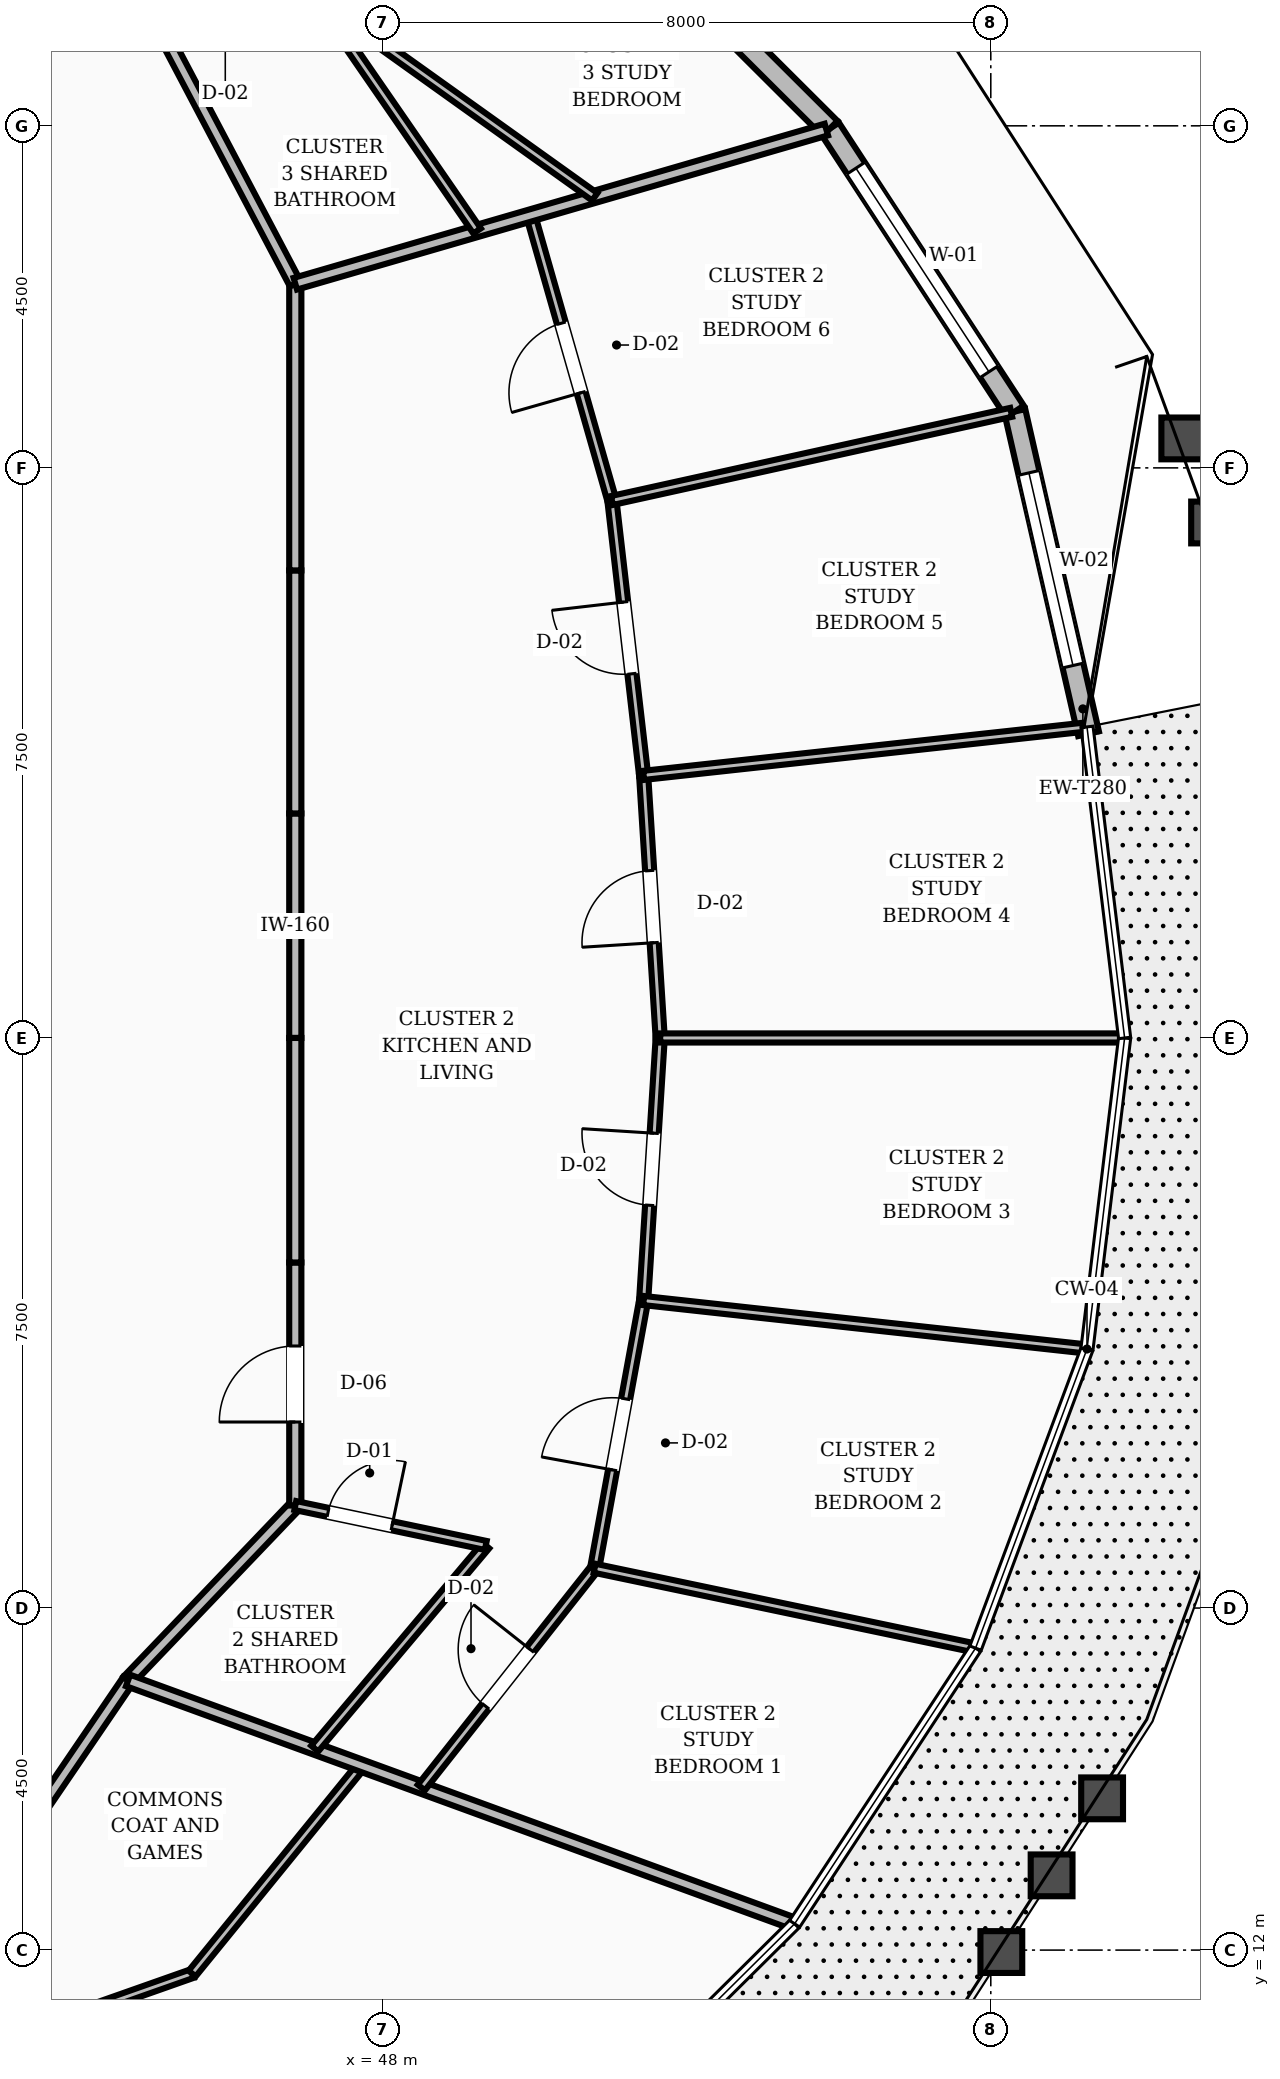
"""IFC4 building model, lengths in metres.
Left out: names, types, materials, properties, quantities, classifications, styles, units other than length and angle.
Written with IfcOpenShell. Run it as: python <this file> out.ifc"""

import sys

from ifc_helpers import new_model, si_unit, direction, frame, frame_2d, origin, place, context, subcontext, project, spatial, rectangle, extrude, element, fill, save


model = new_model("IFC4")
c1 = context("Model", 3, precision=1e-05, world=origin(), true_north=direction((0.0, 1.0)))
c2 = subcontext(c1, "Body", "Model", "MODEL_VIEW")
j1 = project(units=[si_unit("LENGTHUNIT", "METRE"), si_unit("PLANEANGLEUNIT", "RADIAN")], contexts=[c1])
p1 = place(None, origin())
s1 = spatial("IfcSite", under=j1, at=p1, CompositionType="ELEMENT")
p2 = place(p1, origin())
s2 = spatial("IfcBuilding", under=s1, at=p2, CompositionType="ELEMENT")
p3 = place(p2, frame((0.0, 0.0, 153.2)))
s3 = spatial("IfcBuildingStorey", under=s2, at=p3, CompositionType="ELEMENT", Elevation=153.2)
p4 = place(p3, frame((57.286, 28.003, 0.0), z_axis=(0.0, 0.0, 1.0), x_axis=(-0.222841571078, 0.974854673374, 0.0)))
e1 = element("IfcWall", 1, at=p4, inside=s3, PredefinedType="STANDARD", context=c2, shape_type="SweptSolid", body=[
    extrude(rectangle(XDim=4.348, YDim=0.28, at=frame_2d((2.174, 0.0))), origin(), (0.0, 0.0, 1.0), 2.82),
])
p5 = place(p4, frame((0.92, 0.0, 0.8)))
e2 = element("IfcOpeningElement", 2, at=p5, cuts=e1, PredefinedType="OPENING", context=c2, shape_type="SweptSolid", body=[
    extrude(rectangle(XDim=2.6, YDim=1.65, at=frame_2d((1.3, 0.825))), frame((0.0, 0.15, 0.0), z_axis=(0.0, -1.0, 0.0), x_axis=(1.0, 0.0, 0.0)), (0.0, 0.0, 1.0), 0.3),
])
p6 = place(p3, frame((56.317, 32.242, 0.0), z_axis=(0.0, 0.0, 1.0), x_axis=(-0.546910623985, 0.837190999338, 0.0)))
e3 = element("IfcWall", 3, at=p6, inside=s3, PredefinedType="STANDARD", context=c2, shape_type="SweptSolid", body=[
    extrude(rectangle(XDim=4.448, YDim=0.28, at=frame_2d((2.224, 0.0))), origin(), (0.0, 0.0, 1.0), 2.82),
])
p7 = place(p6, frame((0.624, 0.0, 0.8)))
e4 = element("IfcOpeningElement", 4, at=p7, cuts=e3, PredefinedType="OPENING", context=c2, shape_type="SweptSolid", body=[
    extrude(rectangle(XDim=3.2, YDim=1.65, at=frame_2d((1.6, 0.825))), frame((0.0, 0.15, 0.0), z_axis=(0.0, -1.0, 0.0), x_axis=(1.0, 0.0, 0.0)), (0.0, 0.0, 1.0), 0.3),
])
p8 = place(p3, frame((53.885, 35.965, 0.0), z_axis=(0.0, 0.0, 1.0), x_axis=(-0.708162399008, 0.706049585108, 0.0)))
e5 = element("IfcWall", 5, at=p8, inside=s3, PredefinedType="STANDARD", context=c2, shape_type="SweptSolid", body=[
    extrude(rectangle(XDim=4.622, YDim=0.28, at=frame_2d((2.311, 0.0))), origin(), (0.0, 0.0, 1.0), 2.82),
])
p9 = place(p3, frame((46.85, 24.0, 0.0), z_axis=(0.0, 0.0, 1.0), x_axis=(0.0, 1.0, 0.0)))
e6 = element("IfcWall", 6, at=p9, inside=s3, PredefinedType="SOLIDWALL", context=c2, shape_type="SweptSolid", body=[
    extrude(rectangle(XDim=2.954, YDim=0.16, at=frame_2d((1.477, 0.0))), origin(), (0.0, 0.0, 1.0), 2.8),
])
p10 = place(p3, frame((46.85, 26.954, 0.0), z_axis=(0.0, 0.0, 1.0), x_axis=(0.0, 1.0, 0.0)))
e7 = element("IfcWall", 7, at=p10, inside=s3, PredefinedType="SOLIDWALL", context=c2, shape_type="SweptSolid", body=[
    extrude(rectangle(XDim=3.197, YDim=0.16, at=frame_2d((1.599, 0.0))), origin(), (0.0, 0.0, 1.0), 2.8),
])
p11 = place(p3, frame((46.85, 30.151, 0.0), z_axis=(0.0, 0.0, 1.0), x_axis=(0.0, 1.0, 0.0)))
e8 = element("IfcWall", 8, at=p11, inside=s3, PredefinedType="SOLIDWALL", context=c2, shape_type="SweptSolid", body=[
    extrude(rectangle(XDim=3.771, YDim=0.16, at=frame_2d((1.886, 0.0))), origin(), (0.0, 0.0, 1.0), 2.8),
])
p12 = place(p3, frame((46.85, 33.923, 0.0), z_axis=(0.0, 0.0, 1.0), x_axis=(-0.466093963429, 0.884735224378, 0.0)))
e9 = element("IfcWall", 9, at=p12, inside=s3, PredefinedType="SOLIDWALL", context=c2, shape_type="SweptSolid", body=[
    extrude(rectangle(XDim=3.648, YDim=0.16, at=frame_2d((1.824, 0.0))), origin(), (0.0, 0.0, 1.0), 2.8),
])
p13 = place(p3, frame((42.95, 13.05, 0.0), z_axis=(0.0, 0.0, 1.0), x_axis=(0.562674669208, 0.826678423955, 0.0)))
e10 = element("IfcWall", 10, at=p13, inside=s3, PredefinedType="SOLIDWALL", context=c2, shape_type="SweptSolid", body=[
    extrude(rectangle(XDim=3.021, YDim=0.16, at=frame_2d((1.511, 0.0))), origin(), (0.0, 0.0, 1.0), 2.8),
])
p14 = place(p3, frame((44.65, 15.548, 0.0), z_axis=(0.0, 0.0, 1.0), x_axis=(0.691055487108, 0.722801711216, 0.0)))
e11 = element("IfcWall", 11, at=p14, inside=s3, PredefinedType="SOLIDWALL", context=c2, shape_type="SweptSolid", body=[
    extrude(rectangle(XDim=3.184, YDim=0.16, at=frame_2d((1.592, 0.0))), origin(), (0.0, 0.0, 1.0), 2.8),
])
p15 = place(p3, frame((46.85, 17.849, 0.0), z_axis=(0.0, 0.0, 1.0), x_axis=(0.0, 1.0, 0.0)))
e12 = element("IfcWall", 12, at=p15, inside=s3, PredefinedType="SOLIDWALL", context=c2, shape_type="SweptSolid", body=[
    extrude(rectangle(XDim=3.197, YDim=0.16, at=frame_2d((1.599, 0.0))), origin(), (0.0, 0.0, 1.0), 2.8),
])
p16 = place(p15, frame((1.099, 0.0, 0.0)))
e13 = element("IfcOpeningElement", 13, at=p16, cuts=e12, PredefinedType="OPENING", context=c2, shape_type="SweptSolid", body=[
    extrude(rectangle(XDim=1.0, YDim=2.1, at=frame_2d((0.5, 1.05))), frame((0.0, 0.09, 0.0), z_axis=(0.0, -1.0, 0.0), x_axis=(1.0, 0.0, 0.0)), (0.0, 0.0, 1.0), 0.18),
])
p17 = place(p3, frame((46.85, 21.046, 0.0), z_axis=(0.0, 0.0, 1.0), x_axis=(0.0, 1.0, 0.0)))
e14 = element("IfcWall", 14, at=p17, inside=s3, PredefinedType="SOLIDWALL", context=c2, shape_type="SweptSolid", body=[
    extrude(rectangle(XDim=2.954, YDim=0.16, at=frame_2d((1.477, 0.0))), origin(), (0.0, 0.0, 1.0), 2.8),
])
p18 = place(p3, frame((41.982, 10.453, 0.0), z_axis=(0.0, 0.0, 1.0), x_axis=(0.94308593852, 0.332549113013, 0.0)))
e15 = element("IfcWall", 15, at=p18, inside=s3, PredefinedType="PARTITIONING", context=c2, shape_type="SweptSolid", body=[
    extrude(rectangle(XDim=3.723, YDim=0.12, at=frame_2d((1.861, 0.0))), origin(), (0.0, 0.0, 1.0), 2.8),
])
p19 = place(p3, frame((45.493, 11.691, 0.0), z_axis=(0.0, 0.0, 1.0), x_axis=(0.631181350176, 0.775635290062, 0.0)))
e16 = element("IfcWall", 16, at=p19, inside=s3, PredefinedType="PARTITIONING", context=c2, shape_type="SweptSolid", body=[
    extrude(rectangle(XDim=3.527, YDim=0.12, at=frame_2d((1.764, 0.0))), origin(), (0.0, 0.0, 1.0), 2.8),
])
p20 = place(p3, frame((44.65, 15.548, 0.0), z_axis=(0.0, 0.0, 1.0), x_axis=(0.939358933145, -0.342935554763, 0.0)))
e17 = element("IfcWall", 17, at=p20, inside=s3, PredefinedType="SOLIDWALL", context=c2, shape_type="SweptSolid", body=[
    extrude(rectangle(XDim=9.285, YDim=0.16, at=frame_2d((4.643, 0.0))), origin(), (0.0, 0.0, 1.0), 2.8),
])
p21 = place(p3, frame((47.105, 14.651, 0.0), z_axis=(0.0, 0.0, 1.0), x_axis=(0.644148656965, 0.764900325357, 0.0)))
e18 = element("IfcWall", 18, at=p21, inside=s3, PredefinedType="PARTITIONING", context=c2, shape_type="SweptSolid", body=[
    extrude(rectangle(XDim=3.494, YDim=0.12, at=frame_2d((1.747, 0.0))), origin(), (0.0, 0.0, 1.0), 2.8),
])
p22 = place(p3, frame((46.85, 17.849, 0.0), z_axis=(0.0, 0.0, 1.0), x_axis=(0.978719420842, -0.205203058618, 0.0)))
e19 = element("IfcWall", 19, at=p22, inside=s3, PredefinedType="PARTITIONING", context=c2, shape_type="SweptSolid", body=[
    extrude(rectangle(XDim=2.56, YDim=0.12, at=frame_2d((1.28, 0.0))), origin(), (0.0, 0.0, 1.0), 2.8),
])
p23 = place(p22, frame((0.44, 0.0, 0.0)))
e20 = element("IfcOpeningElement", 20, at=p23, cuts=e19, PredefinedType="OPENING", context=c2, shape_type="SweptSolid", body=[
    extrude(rectangle(XDim=0.86, YDim=2.1, at=frame_2d((0.43, 1.05))), frame((0.0, 0.07, 0.0), z_axis=(0.0, -1.0, 0.0), x_axis=(1.0, 0.0, 0.0)), (0.0, 0.0, 1.0), 0.14),
])
p24 = place(p3, frame((48.508, 14.139, 0.0), z_axis=(0.0, 0.0, 1.0), x_axis=(0.620027462407, 0.784580107994, 0.0)))
e21 = element("IfcWall", 21, at=p24, inside=s3, PredefinedType="PARTITIONING", context=c2, shape_type="SweptSolid", body=[
    extrude(rectangle(XDim=3.677, YDim=0.12, at=frame_2d((1.838, 0.0))), origin(), (0.0, 0.0, 1.0), 2.8),
])
p25 = place(p24, frame((1.363, 0.0, 0.0)))
e22 = element("IfcOpeningElement", 22, at=p25, cuts=e21, PredefinedType="OPENING", context=c2, shape_type="SweptSolid", body=[
    extrude(rectangle(XDim=0.95, YDim=2.1, at=frame_2d((0.475, 1.05))), frame((0.0, 0.07, 0.0), z_axis=(0.0, -1.0, 0.0), x_axis=(1.0, 0.0, 0.0)), (0.0, 0.0, 1.0), 0.14),
])
p26 = place(p3, frame((50.788, 17.023, 0.0), z_axis=(0.0, 0.0, 1.0), x_axis=(0.180145354379, 0.983640000862, 0.0)))
e23 = element("IfcWall", 23, at=p26, inside=s3, PredefinedType="PARTITIONING", context=c2, shape_type="SweptSolid", body=[
    extrude(rectangle(XDim=3.581, YDim=0.12, at=frame_2d((1.79, 0.0))), origin(), (0.0, 0.0, 1.0), 2.8),
])
p27 = place(p26, frame((1.315, 0.0, 0.0)))
e24 = element("IfcOpeningElement", 24, at=p27, cuts=e23, PredefinedType="OPENING", context=c2, shape_type="SweptSolid", body=[
    extrude(rectangle(XDim=0.95, YDim=2.1, at=frame_2d((0.475, 1.05))), frame((0.0, 0.07, 0.0), z_axis=(0.0, -1.0, 0.0), x_axis=(1.0, 0.0, 0.0)), (0.0, 0.0, 1.0), 0.14),
])
p28 = place(p3, frame((50.788, 17.023, 0.0), z_axis=(0.0, 0.0, 1.0), x_axis=(0.978720068991, -0.205199967239, 0.0)))
e25 = element("IfcWall", 25, at=p28, inside=s3, PredefinedType="PARTITIONING", context=c2, shape_type="SweptSolid", body=[
    extrude(rectangle(XDim=5.071, YDim=0.12, at=frame_2d((2.535, 0.0))), origin(), (0.0, 0.0, 1.0), 2.8),
])
p29 = place(p3, frame((51.433, 20.545, 0.0), z_axis=(0.0, 0.0, 1.0), x_axis=(0.062913986288, 0.998018952891, 0.0)))
e26 = element("IfcWall", 26, at=p29, inside=s3, PredefinedType="PARTITIONING", context=c2, shape_type="SweptSolid", body=[
    extrude(rectangle(XDim=3.461, YDim=0.12, at=frame_2d((1.731, 0.0))), origin(), (0.0, 0.0, 1.0), 2.8),
])
p30 = place(p29, frame((1.256, 0.0, 0.0)))
e27 = element("IfcOpeningElement", 27, at=p30, cuts=e26, PredefinedType="OPENING", context=c2, shape_type="SweptSolid", body=[
    extrude(rectangle(XDim=0.95, YDim=2.1, at=frame_2d((0.475, 1.05))), frame((0.0, 0.07, 0.0), z_axis=(0.0, -1.0, 0.0), x_axis=(1.0, 0.0, 0.0)), (0.0, 0.0, 1.0), 0.14),
])
p31 = place(p3, frame((51.433, 20.545, 0.0), z_axis=(0.0, 0.0, 1.0), x_axis=(0.994075164039, -0.108694839991, 0.0)))
e28 = element("IfcWall", 28, at=p31, inside=s3, PredefinedType="PARTITIONING", context=c2, shape_type="SweptSolid", body=[
    extrude(rectangle(XDim=5.817, YDim=0.12, at=frame_2d((2.909, 0.0))), origin(), (0.0, 0.0, 1.0), 2.8),
])
p32 = place(p3, frame((51.651, 24.0, 0.0), z_axis=(0.0, 0.0, 1.0), x_axis=(-0.062913986288, 0.998018952891, 0.0)))
e29 = element("IfcWall", 29, at=p32, inside=s3, PredefinedType="PARTITIONING", context=c2, shape_type="SweptSolid", body=[
    extrude(rectangle(XDim=3.461, YDim=0.12, at=frame_2d((1.731, 0.0))), origin(), (0.0, 0.0, 1.0), 2.8),
])
p33 = place(p32, frame((1.256, 0.0, 0.0)))
e30 = element("IfcOpeningElement", 30, at=p33, cuts=e29, PredefinedType="OPENING", context=c2, shape_type="SweptSolid", body=[
    extrude(rectangle(XDim=0.95, YDim=2.1, at=frame_2d((0.475, 1.05))), frame((0.0, 0.07, 0.0), z_axis=(0.0, -1.0, 0.0), x_axis=(1.0, 0.0, 0.0)), (0.0, 0.0, 1.0), 0.14),
])
p34 = place(p3, frame((51.651, 24.0, 0.0), z_axis=(0.0, 0.0, 1.0), x_axis=(1.0, 0.0, 0.0)))
e31 = element("IfcWall", 31, at=p34, inside=s3, PredefinedType="PARTITIONING", context=c2, shape_type="SweptSolid", body=[
    extrude(rectangle(XDim=6.06, YDim=0.12, at=frame_2d((3.03, 0.0))), origin(), (0.0, 0.0, 1.0), 2.8),
])
p35 = place(p3, frame((51.433, 27.455, 0.0), z_axis=(0.0, 0.0, 1.0), x_axis=(-0.114685202716, 0.993401884575, 0.0)))
e32 = element("IfcWall", 32, at=p35, inside=s3, PredefinedType="PARTITIONING", context=c2, shape_type="SweptSolid", body=[
    extrude(rectangle(XDim=3.64, YDim=0.12, at=frame_2d((1.82, 0.0))), origin(), (0.0, 0.0, 1.0), 2.8),
])
p36 = place(p35, frame((1.345, 0.0, 0.0)))
e33 = element("IfcOpeningElement", 33, at=p36, cuts=e32, PredefinedType="OPENING", context=c2, shape_type="SweptSolid", body=[
    extrude(rectangle(XDim=0.95, YDim=2.1, at=frame_2d((0.475, 1.05))), frame((0.0, 0.07, 0.0), z_axis=(0.0, -1.0, 0.0), x_axis=(1.0, 0.0, 0.0)), (0.0, 0.0, 1.0), 0.14),
])
p37 = place(p3, frame((51.433, 27.455, 0.0), z_axis=(0.0, 0.0, 1.0), x_axis=(0.994075164039, 0.108694839991, 0.0)))
e34 = element("IfcWall", 34, at=p37, inside=s3, PredefinedType="PARTITIONING", context=c2, shape_type="SweptSolid", body=[
    extrude(rectangle(XDim=5.817, YDim=0.12, at=frame_2d((2.909, 0.0))), origin(), (0.0, 0.0, 1.0), 2.8),
])
p38 = place(p3, frame((51.015, 31.071, 0.0), z_axis=(0.0, 0.0, 1.0), x_axis=(-0.27436560158, 0.961625455502, 0.0)))
e35 = element("IfcWall", 35, at=p38, inside=s3, PredefinedType="PARTITIONING", context=c2, shape_type="SweptSolid", body=[
    extrude(rectangle(XDim=3.9, YDim=0.12, at=frame_2d((1.95, 0.0))), origin(), (0.0, 0.0, 1.0), 2.8),
])
p39 = place(p38, frame((1.475, 0.0, 0.0)))
e36 = element("IfcOpeningElement", 36, at=p39, cuts=e35, PredefinedType="OPENING", context=c2, shape_type="SweptSolid", body=[
    extrude(rectangle(XDim=0.95, YDim=2.1, at=frame_2d((0.475, 1.05))), frame((0.0, 0.07, 0.0), z_axis=(0.0, -1.0, 0.0), x_axis=(1.0, 0.0, 0.0)), (0.0, 0.0, 1.0), 0.14),
])
p40 = place(p3, frame((51.015, 31.071, 0.0), z_axis=(0.0, 0.0, 1.0), x_axis=(0.976477702839, 0.215618403337, 0.0)))
e37 = element("IfcWall", 37, at=p40, inside=s3, PredefinedType="PARTITIONING", context=c2, shape_type="SweptSolid", body=[
    extrude(rectangle(XDim=5.379, YDim=0.12, at=frame_2d((2.69, 0.0))), origin(), (0.0, 0.0, 1.0), 2.8),
])
p41 = place(p3, frame((46.85, 33.923, 0.0), z_axis=(0.0, 0.0, 1.0), x_axis=(0.960341299292, 0.278827166672, 0.0)))
e38 = element("IfcWall", 38, at=p41, inside=s3, PredefinedType="SOLIDWALL", context=c2, shape_type="SweptSolid", body=[
    extrude(rectangle(XDim=7.275, YDim=0.16, at=frame_2d((3.638, 0.0))), origin(), (0.0, 0.0, 1.0), 2.8),
])
p42 = place(p3, frame((49.242, 34.617, 0.0), z_axis=(0.0, 0.0, 1.0), x_axis=(-0.567828622135, 0.823146800932, 0.0)))
e39 = element("IfcWall", 39, at=p42, inside=s3, PredefinedType="PARTITIONING", context=c2, shape_type="SweptSolid", body=[
    extrude(rectangle(XDim=3.936, YDim=0.12, at=frame_2d((1.968, 0.0))), origin(), (0.0, 0.0, 1.0), 2.8),
])
p43 = place(p3, frame((50.79, 35.066, 0.0), z_axis=(0.0, 0.0, 1.0), x_axis=(-0.81361936363, 0.581397911182, 0.0)))
e40 = element("IfcWall", 40, at=p43, inside=s3, PredefinedType="PARTITIONING", context=c2, shape_type="SweptSolid", body=[
    extrude(rectangle(XDim=8.241, YDim=0.12, at=frame_2d((4.121, 0.0))), origin(), (0.0, 0.0, 1.0), 2.8),
])
p44 = place(p43, frame((5.056, 0.0, 0.0)))
e41 = element("IfcOpeningElement", 41, at=p44, cuts=e40, PredefinedType="OPENING", context=c2, shape_type="SweptSolid", body=[
    extrude(rectangle(XDim=0.95, YDim=2.1, at=frame_2d((0.475, 1.05))), frame((0.0, 0.07, 0.0), z_axis=(0.0, -1.0, 0.0), x_axis=(1.0, 0.0, 0.0)), (0.0, 0.0, 1.0), 0.14),
])
p45 = place(p5, origin())
e42 = element("IfcWindow", 42, at=p45, inside=s3, PartitioningType="SINGLE_PANEL", PredefinedType="WINDOW", context=c2, shape_type="SweptSolid", body=[
    extrude(rectangle(XDim=2.6, YDim=1.65, at=frame_2d((1.3, 0.825))), frame((0.0, 0.03, 0.0), z_axis=(0.0, -1.0, 0.0), x_axis=(1.0, 0.0, 0.0)), (0.0, 0.0, 1.0), 0.06),
])
fill(e2, e42)
p46 = place(p7, origin())
e43 = element("IfcWindow", 43, at=p46, inside=s3, PartitioningType="SINGLE_PANEL", PredefinedType="WINDOW", context=c2, shape_type="SweptSolid", body=[
    extrude(rectangle(XDim=3.2, YDim=1.65, at=frame_2d((1.6, 0.825))), frame((0.0, 0.03, 0.0), z_axis=(0.0, -1.0, 0.0), x_axis=(1.0, 0.0, 0.0)), (0.0, 0.0, 1.0), 0.06),
])
fill(e4, e43)
p47 = place(p23, origin())
e44 = element("IfcDoor", 44, at=p47, inside=s3, OperationType="SINGLE_SWING_RIGHT", PredefinedType="DOOR", context=c2, shape_type="SweptSolid", body=[
    extrude(rectangle(XDim=0.86, YDim=2.1, at=frame_2d((0.43, 1.05))), frame((0.0, 0.025, 0.0), z_axis=(0.0, -1.0, 0.0), x_axis=(1.0, 0.0, 0.0)), (0.0, 0.0, 1.0), 0.05),
])
fill(e20, e44)
p48 = place(p16, origin())
e45 = element("IfcDoor", 45, at=p48, inside=s3, OperationType="SINGLE_SWING_LEFT", PredefinedType="DOOR", context=c2, shape_type="SweptSolid", body=[
    extrude(rectangle(XDim=1.0, YDim=2.1, at=frame_2d((0.5, 1.05))), frame((0.0, 0.025, 0.0), z_axis=(0.0, -1.0, 0.0), x_axis=(1.0, 0.0, 0.0)), (0.0, 0.0, 1.0), 0.05),
])
fill(e13, e45)
p49 = place(p25, origin())
e46 = element("IfcDoor", 46, at=p49, inside=s3, OperationType="SINGLE_SWING_RIGHT", PredefinedType="DOOR", context=c2, shape_type="SweptSolid", body=[
    extrude(rectangle(XDim=0.95, YDim=2.1, at=frame_2d((0.475, 1.05))), frame((0.0, 0.025, 0.0), z_axis=(0.0, -1.0, 0.0), x_axis=(1.0, 0.0, 0.0)), (0.0, 0.0, 1.0), 0.05),
])
fill(e22, e46)
p50 = place(p27, origin())
e47 = element("IfcDoor", 47, at=p50, inside=s3, OperationType="SINGLE_SWING_LEFT", PredefinedType="DOOR", context=c2, shape_type="SweptSolid", body=[
    extrude(rectangle(XDim=0.95, YDim=2.1, at=frame_2d((0.475, 1.05))), frame((0.0, 0.025, 0.0), z_axis=(0.0, -1.0, 0.0), x_axis=(1.0, 0.0, 0.0)), (0.0, 0.0, 1.0), 0.05),
])
fill(e24, e47)
p51 = place(p30, origin())
e48 = element("IfcDoor", 48, at=p51, inside=s3, OperationType="SINGLE_SWING_RIGHT", PredefinedType="DOOR", context=c2, shape_type="SweptSolid", body=[
    extrude(rectangle(XDim=0.95, YDim=2.1, at=frame_2d((0.475, 1.05))), frame((0.0, 0.025, 0.0), z_axis=(0.0, -1.0, 0.0), x_axis=(1.0, 0.0, 0.0)), (0.0, 0.0, 1.0), 0.05),
])
fill(e27, e48)
p52 = place(p33, origin())
e49 = element("IfcDoor", 49, at=p52, inside=s3, OperationType="SINGLE_SWING_LEFT", PredefinedType="DOOR", context=c2, shape_type="SweptSolid", body=[
    extrude(rectangle(XDim=0.95, YDim=2.1, at=frame_2d((0.475, 1.05))), frame((0.0, 0.025, 0.0), z_axis=(0.0, -1.0, 0.0), x_axis=(1.0, 0.0, 0.0)), (0.0, 0.0, 1.0), 0.05),
])
fill(e30, e49)
p53 = place(p36, origin())
e50 = element("IfcDoor", 50, at=p53, inside=s3, OperationType="SINGLE_SWING_RIGHT", PredefinedType="DOOR", context=c2, shape_type="SweptSolid", body=[
    extrude(rectangle(XDim=0.95, YDim=2.1, at=frame_2d((0.475, 1.05))), frame((0.0, 0.025, 0.0), z_axis=(0.0, -1.0, 0.0), x_axis=(1.0, 0.0, 0.0)), (0.0, 0.0, 1.0), 0.05),
])
fill(e33, e50)
p54 = place(p39, origin())
e51 = element("IfcDoor", 51, at=p54, inside=s3, OperationType="SINGLE_SWING_LEFT", PredefinedType="DOOR", context=c2, shape_type="SweptSolid", body=[
    extrude(rectangle(XDim=0.95, YDim=2.1, at=frame_2d((0.475, 1.05))), frame((0.0, 0.025, 0.0), z_axis=(0.0, -1.0, 0.0), x_axis=(1.0, 0.0, 0.0)), (0.0, 0.0, 1.0), 0.05),
])
fill(e36, e51)
save(model, sys.argv[1])
